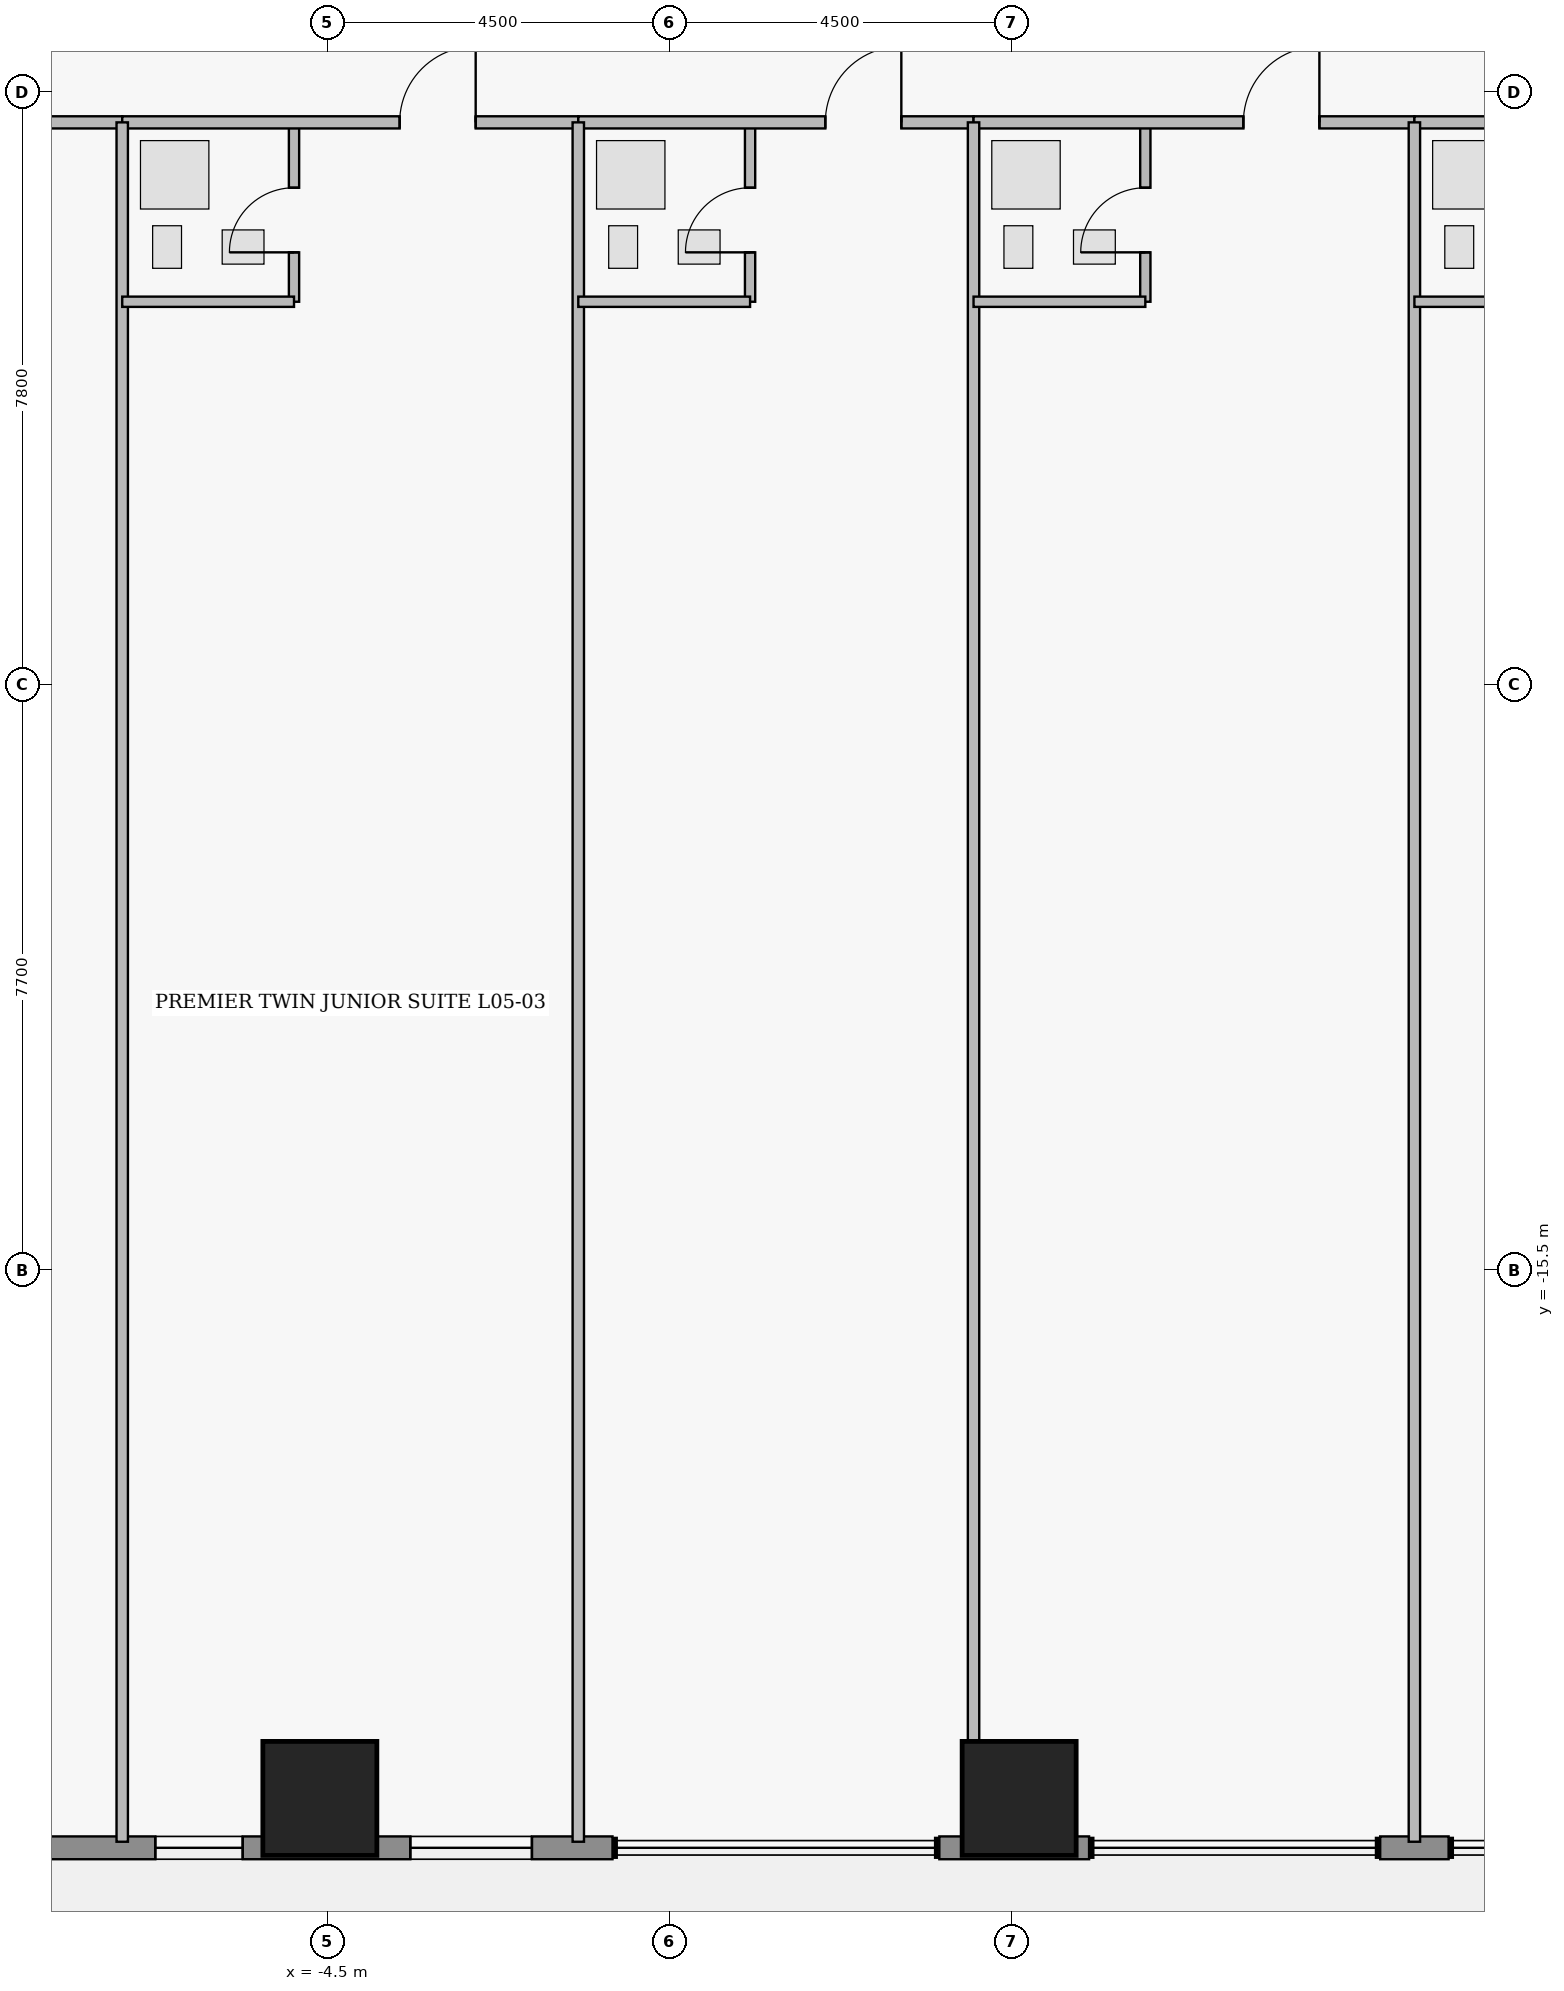
"""IFC4 building model, lengths in metres.
Left out: names, types, materials, properties, quantities, classifications, styles, units other than length and angle.
Written with IfcOpenShell. Run it as: python <this file> out.ifc"""

import sys

from ifc_helpers import new_model, si_unit, direction, frame, frame_2d, origin, origin_2d, place, context, subcontext, project, spatial, rectangle, extrude, element, fill, save


model = new_model("IFC4")
c1 = context("Model", 3, precision=1e-05, world=origin(), true_north=direction((0.0, 1.0)))
c2 = subcontext(c1, "Body", "Model", "MODEL_VIEW")
j1 = project(units=[si_unit("LENGTHUNIT", "METRE"), si_unit("PLANEANGLEUNIT", "RADIAN")], contexts=[c1])
p1 = place(None, origin())
s1 = spatial("IfcSite", under=j1, at=p1, CompositionType="ELEMENT")
p2 = place(p1, origin())
s2 = spatial("IfcBuilding", under=s1, at=p2, CompositionType="ELEMENT")
p3 = place(p2, frame((0.0, 0.0, 27.6)))
s3 = spatial("IfcBuildingStorey", under=s2, at=p3, CompositionType="ELEMENT", Elevation=27.6)
for number, where, z_axis, x_axis in (
    (1, (-4.6, -22.45, 0.0), (0.0, 0.0, 1.0), (1.0, 0.0, 0.0)),
    (2, (4.6, -22.45, 0.0), (0.0, 0.0, 1.0), (1.0, 0.0, 0.0)),
):
    element("IfcColumn", number, at=place(p3, frame(where, z_axis=z_axis, x_axis=x_axis)), inside=s3, PredefinedType="COLUMN", context=c2, shape_type="SweptSolid", body=[
        extrude(rectangle(XDim=1.5, YDim=1.5, at=origin_2d()), origin(), (0.0, 0.0, 1.0), 3.65),
    ])
p4 = place(p3, frame((10.25, -23.1, 0.0), z_axis=(0.0, 0.0, 1.0), x_axis=(-1.0, 0.0, 0.0)))
e3 = element("IfcWall", 3, at=p4, inside=s3, PredefinedType="STANDARD", context=c2, shape_type="SweptSolid", body=[
    extrude(rectangle(XDim=0.9, YDim=0.3, at=frame_2d((0.45, 0.0))), origin(), (0.0, 0.0, 1.0), 3.43),
])
p5 = place(p3, frame((5.52, -23.1, 0.0), z_axis=(0.0, 0.0, 1.0), x_axis=(-1.0, 0.0, 0.0)))
e4 = element("IfcWall", 4, at=p5, inside=s3, PredefinedType="STANDARD", context=c2, shape_type="SweptSolid", body=[
    extrude(rectangle(XDim=1.97, YDim=0.3, at=frame_2d((0.985, 0.0))), origin(), (0.0, 0.0, 1.0), 3.43),
])
p6 = place(p3, frame((-0.75, -23.1, 0.0), z_axis=(0.0, 0.0, 1.0), x_axis=(-1.0, 0.0, 0.0)))
e5 = element("IfcWall", 5, at=p6, inside=s3, PredefinedType="STANDARD", context=c2, shape_type="SweptSolid", body=[
    extrude(rectangle(XDim=13.97, YDim=0.3, at=frame_2d((6.985, 0.0))), origin(), (0.0, 0.0, 1.0), 3.43),
])
p7 = place(p6, frame((8.053, 0.0, 0.0)))
e6 = element("IfcOpeningElement", 6, at=p7, cuts=e5, PredefinedType="OPENING", context=c2, shape_type="SweptSolid", body=[
    extrude(rectangle(XDim=1.05, YDim=2.2, at=frame_2d((0.525, 1.1))), frame((0.0, 0.16, 0.0), z_axis=(0.0, -1.0, 0.0), x_axis=(1.0, 0.0, 0.0)), (0.0, 0.0, 1.0), 0.32),
])
p8 = place(p6, frame((1.06, 0.0, 0.85)))
e7 = element("IfcOpeningElement", 7, at=p8, cuts=e5, PredefinedType="OPENING", context=c2, shape_type="SweptSolid", body=[
    extrude(rectangle(XDim=1.6, YDim=1.8, at=frame_2d((0.8, 0.9))), frame((0.0, 0.16, 0.0), z_axis=(0.0, -1.0, 0.0), x_axis=(1.0, 0.0, 0.0)), (0.0, 0.0, 1.0), 0.32),
])
p9 = place(p6, frame((4.865, 0.0, 0.95)))
e8 = element("IfcOpeningElement", 8, at=p9, cuts=e5, PredefinedType="OPENING", context=c2, shape_type="SweptSolid", body=[
    extrude(rectangle(XDim=1.15, YDim=1.55, at=frame_2d((0.575, 0.775))), frame((0.0, 0.16, 0.0), z_axis=(0.0, -1.0, 0.0), x_axis=(1.0, 0.0, 0.0)), (0.0, 0.0, 1.0), 0.32),
])
p10 = place(p6, frame((9.842, 0.0, 0.85)))
e9 = element("IfcOpeningElement", 9, at=p10, cuts=e5, PredefinedType="OPENING", context=c2, shape_type="SweptSolid", body=[
    extrude(rectangle(XDim=1.6, YDim=1.8, at=frame_2d((0.8, 0.9))), frame((0.0, 0.16, 0.0), z_axis=(0.0, -1.0, 0.0), x_axis=(1.0, 0.0, 0.0)), (0.0, 0.0, 1.0), 0.32),
])
p11 = place(p3, frame((-12.8, -0.4, 0.0), z_axis=(0.0, 0.0, 1.0), x_axis=(1.0, 0.0, 0.0)))
e10 = element("IfcWall", 10, at=p11, inside=s3, PredefinedType="PARTITIONING", context=c2, shape_type="SweptSolid", body=[
    extrude(rectangle(XDim=5.6, YDim=0.16, at=frame_2d((2.8, 0.0))), origin(), (0.0, 0.0, 1.0), 3.43),
])
p12 = place(p11, frame((3.45, 0.0, 0.0)))
e11 = element("IfcOpeningElement", 11, at=p12, cuts=e10, PredefinedType="OPENING", context=c2, shape_type="SweptSolid", body=[
    extrude(rectangle(XDim=1.0, YDim=2.15, at=frame_2d((0.5, 1.075))), frame((0.0, 0.09, 0.0), z_axis=(0.0, -1.0, 0.0), x_axis=(1.0, 0.0, 0.0)), (0.0, 0.0, 1.0), 0.18),
])
p13 = place(p3, frame((-4.94, -2.76, 0.0), z_axis=(0.0, 0.0, 1.0), x_axis=(0.0, 1.0, 0.0)))
e12 = element("IfcWall", 12, at=p13, inside=s3, PredefinedType="PLUMBINGWALL", context=c2, shape_type="SweptSolid", body=[
    extrude(rectangle(XDim=2.36, YDim=0.135, at=frame_2d((1.18, 0.0))), origin(), (0.0, 0.0, 1.0), 2.668),
])
p14 = place(p13, frame((0.65, 0.0, 0.0)))
e13 = element("IfcOpeningElement", 13, at=p14, cuts=e12, PredefinedType="OPENING", context=c2, shape_type="SweptSolid", body=[
    extrude(rectangle(XDim=0.85, YDim=2.1, at=frame_2d((0.425, 1.05))), frame((0.0, 0.077, 0.0), z_axis=(0.0, -1.0, 0.0), x_axis=(1.0, 0.0, 0.0)), (0.0, 0.0, 1.0), 0.155),
])
p15 = place(p3, frame((-7.2, -0.4, 0.0), z_axis=(0.0, 0.0, 1.0), x_axis=(1.0, 0.0, 0.0)))
e14 = element("IfcWall", 14, at=p15, inside=s3, PredefinedType="PARTITIONING", context=c2, shape_type="SweptSolid", body=[
    extrude(rectangle(XDim=6.0, YDim=0.16, at=frame_2d((3.0, 0.0))), origin(), (0.0, 0.0, 1.0), 3.43),
])
p16 = place(p15, frame((3.65, 0.0, 0.0)))
e15 = element("IfcOpeningElement", 15, at=p16, cuts=e14, PredefinedType="OPENING", context=c2, shape_type="SweptSolid", body=[
    extrude(rectangle(XDim=1.0, YDim=2.15, at=frame_2d((0.5, 1.075))), frame((0.0, 0.09, 0.0), z_axis=(0.0, -1.0, 0.0), x_axis=(1.0, 0.0, 0.0)), (0.0, 0.0, 1.0), 0.18),
])
p17 = place(p3, frame((1.06, -2.76, 0.0), z_axis=(0.0, 0.0, 1.0), x_axis=(0.0, 1.0, 0.0)))
e16 = element("IfcWall", 16, at=p17, inside=s3, PredefinedType="PLUMBINGWALL", context=c2, shape_type="SweptSolid", body=[
    extrude(rectangle(XDim=2.36, YDim=0.135, at=frame_2d((1.18, 0.0))), origin(), (0.0, 0.0, 1.0), 3.43),
])
p18 = place(p17, frame((0.65, 0.0, 0.0)))
e17 = element("IfcOpeningElement", 17, at=p18, cuts=e16, PredefinedType="OPENING", context=c2, shape_type="SweptSolid", body=[
    extrude(rectangle(XDim=0.85, YDim=2.1, at=frame_2d((0.425, 1.05))), frame((0.0, 0.077, 0.0), z_axis=(0.0, -1.0, 0.0), x_axis=(1.0, 0.0, 0.0)), (0.0, 0.0, 1.0), 0.155),
])
p19 = place(p3, frame((-1.2, -0.4, 0.0), z_axis=(0.0, 0.0, 1.0), x_axis=(1.0, 0.0, 0.0)))
e18 = element("IfcWall", 18, at=p19, inside=s3, PredefinedType="PARTITIONING", context=c2, shape_type="SweptSolid", body=[
    extrude(rectangle(XDim=5.2, YDim=0.16, at=frame_2d((2.6, 0.0))), origin(), (0.0, 0.0, 1.0), 3.43),
])
p20 = place(p19, frame((3.25, 0.0, 0.0)))
e19 = element("IfcOpeningElement", 19, at=p20, cuts=e18, PredefinedType="OPENING", context=c2, shape_type="SweptSolid", body=[
    extrude(rectangle(XDim=1.0, YDim=2.15, at=frame_2d((0.5, 1.075))), frame((0.0, 0.09, 0.0), z_axis=(0.0, -1.0, 0.0), x_axis=(1.0, 0.0, 0.0)), (0.0, 0.0, 1.0), 0.18),
])
p21 = place(p3, frame((6.26, -2.76, 0.0), z_axis=(0.0, 0.0, 1.0), x_axis=(0.0, 1.0, 0.0)))
e20 = element("IfcWall", 20, at=p21, inside=s3, PredefinedType="PLUMBINGWALL", context=c2, shape_type="SweptSolid", body=[
    extrude(rectangle(XDim=2.36, YDim=0.135, at=frame_2d((1.18, 0.0))), origin(), (0.0, 0.0, 1.0), 3.43),
])
p22 = place(p21, frame((0.65, 0.0, 0.0)))
e21 = element("IfcOpeningElement", 21, at=p22, cuts=e20, PredefinedType="OPENING", context=c2, shape_type="SweptSolid", body=[
    extrude(rectangle(XDim=0.85, YDim=2.1, at=frame_2d((0.425, 1.05))), frame((0.0, 0.077, 0.0), z_axis=(0.0, -1.0, 0.0), x_axis=(1.0, 0.0, 0.0)), (0.0, 0.0, 1.0), 0.155),
])
p23 = place(p3, frame((4.0, -0.4, 0.0), z_axis=(0.0, 0.0, 1.0), x_axis=(1.0, 0.0, 0.0)))
e22 = element("IfcWall", 22, at=p23, inside=s3, PredefinedType="PARTITIONING", context=c2, shape_type="SweptSolid", body=[
    extrude(rectangle(XDim=5.8, YDim=0.16, at=frame_2d((2.9, 0.0))), origin(), (0.0, 0.0, 1.0), 3.43),
])
p24 = place(p23, frame((3.55, 0.0, 0.0)))
e23 = element("IfcOpeningElement", 23, at=p24, cuts=e22, PredefinedType="OPENING", context=c2, shape_type="SweptSolid", body=[
    extrude(rectangle(XDim=1.0, YDim=2.15, at=frame_2d((0.5, 1.075))), frame((0.0, 0.09, 0.0), z_axis=(0.0, -1.0, 0.0), x_axis=(1.0, 0.0, 0.0)), (0.0, 0.0, 1.0), 0.18),
])
p25 = place(p3, frame((9.8, -0.4, 0.0), z_axis=(0.0, 0.0, 1.0), x_axis=(1.0, 0.0, 0.0)))
e24 = element("IfcWall", 24, at=p25, inside=s3, PredefinedType="PARTITIONING", context=c2, shape_type="SweptSolid", body=[
    extrude(rectangle(XDim=4.6, YDim=0.16, at=frame_2d((2.3, 0.0))), origin(), (0.0, 0.0, 1.0), 3.43),
])
p26 = place(p25, frame((2.95, 0.0, 0.0)))
e25 = element("IfcOpeningElement", 25, at=p26, cuts=e24, PredefinedType="OPENING", context=c2, shape_type="SweptSolid", body=[
    extrude(rectangle(XDim=1.0, YDim=2.15, at=frame_2d((0.5, 1.075))), frame((0.0, 0.09, 0.0), z_axis=(0.0, -1.0, 0.0), x_axis=(1.0, 0.0, 0.0)), (0.0, 0.0, 1.0), 0.18),
])
p27 = place(p3, frame((-7.2, -23.02, 0.0), z_axis=(0.0, 0.0, 1.0), x_axis=(0.0, 1.0, 0.0)))
e26 = element("IfcWall", 26, at=p27, inside=s3, PredefinedType="PARTITIONING", context=c2, shape_type="SweptSolid", body=[
    extrude(rectangle(XDim=22.62, YDim=0.15, at=frame_2d((11.31, 0.0))), origin(), (0.0, 0.0, 1.0), 3.43),
])
p28 = place(p3, frame((-7.2, -2.76, 0.0), z_axis=(0.0, 0.0, 1.0), x_axis=(1.0, 0.0, 0.0)))
e27 = element("IfcWall", 27, at=p28, inside=s3, PredefinedType="PLUMBINGWALL", context=c2, shape_type="SweptSolid", body=[
    extrude(rectangle(XDim=2.26, YDim=0.135, at=frame_2d((1.13, 0.0))), origin(), (0.0, 0.0, 1.0), 3.43),
])
p29 = place(p3, frame((-1.2, -23.02, 0.0), z_axis=(0.0, 0.0, 1.0), x_axis=(0.0, 1.0, 0.0)))
e28 = element("IfcWall", 28, at=p29, inside=s3, PredefinedType="PARTITIONING", context=c2, shape_type="SweptSolid", body=[
    extrude(rectangle(XDim=22.62, YDim=0.15, at=frame_2d((11.31, 0.0))), origin(), (0.0, 0.0, 1.0), 3.43),
])
p30 = place(p3, frame((-1.2, -2.76, 0.0), z_axis=(0.0, 0.0, 1.0), x_axis=(1.0, 0.0, 0.0)))
e29 = element("IfcWall", 29, at=p30, inside=s3, PredefinedType="PLUMBINGWALL", context=c2, shape_type="SweptSolid", body=[
    extrude(rectangle(XDim=2.26, YDim=0.135, at=frame_2d((1.13, 0.0))), origin(), (0.0, 0.0, 1.0), 3.43),
])
p31 = place(p3, frame((4.0, -23.02, 0.0), z_axis=(0.0, 0.0, 1.0), x_axis=(0.0, 1.0, 0.0)))
e30 = element("IfcWall", 30, at=p31, inside=s3, PredefinedType="PARTITIONING", context=c2, shape_type="SweptSolid", body=[
    extrude(rectangle(XDim=22.62, YDim=0.15, at=frame_2d((11.31, 0.0))), origin(), (0.0, 0.0, 1.0), 3.43),
])
p32 = place(p3, frame((4.0, -2.76, 0.0), z_axis=(0.0, 0.0, 1.0), x_axis=(1.0, 0.0, 0.0)))
e31 = element("IfcWall", 31, at=p32, inside=s3, PredefinedType="PLUMBINGWALL", context=c2, shape_type="SweptSolid", body=[
    extrude(rectangle(XDim=2.26, YDim=0.135, at=frame_2d((1.13, 0.0))), origin(), (0.0, 0.0, 1.0), 3.43),
])
p33 = place(p3, frame((9.8, -23.02, 0.0), z_axis=(0.0, 0.0, 1.0), x_axis=(0.0, 1.0, 0.0)))
e32 = element("IfcWall", 32, at=p33, inside=s3, PredefinedType="PARTITIONING", context=c2, shape_type="SweptSolid", body=[
    extrude(rectangle(XDim=22.62, YDim=0.15, at=frame_2d((11.31, 0.0))), origin(), (0.0, 0.0, 1.0), 3.43),
])
p34 = place(p3, frame((9.8, -2.76, 0.0), z_axis=(0.0, 0.0, 1.0), x_axis=(1.0, 0.0, 0.0)))
e33 = element("IfcWall", 33, at=p34, inside=s3, PredefinedType="PLUMBINGWALL", context=c2, shape_type="SweptSolid", body=[
    extrude(rectangle(XDim=2.26, YDim=0.135, at=frame_2d((1.13, 0.0))), origin(), (0.0, 0.0, 1.0), 3.43),
])
p35 = place(p8, origin())
e34 = element("IfcWindow", 34, at=p35, inside=s3, PartitioningType="SINGLE_PANEL", PredefinedType="WINDOW", context=c2, shape_type="SweptSolid", body=[
    extrude(rectangle(XDim=1.6, YDim=1.8, at=frame_2d((0.8, 0.9))), frame((0.0, 0.03, 0.0), z_axis=(0.0, -1.0, 0.0), x_axis=(1.0, 0.0, 0.0)), (0.0, 0.0, 1.0), 0.06),
])
fill(e7, e34)
p36 = place(p9, origin())
e35 = element("IfcWindow", 35, at=p36, inside=s3, PartitioningType="SINGLE_PANEL", PredefinedType="WINDOW", context=c2, shape_type="SweptSolid", body=[
    extrude(rectangle(XDim=1.15, YDim=1.55, at=frame_2d((0.575, 0.775))), frame((0.0, 0.03, 0.0), z_axis=(0.0, -1.0, 0.0), x_axis=(1.0, 0.0, 0.0)), (0.0, 0.0, 1.0), 0.06),
])
fill(e8, e35)
p37 = place(p14, origin())
e36 = element("IfcDoor", 36, at=p37, inside=s3, OperationType="SINGLE_SWING_LEFT", PredefinedType="DOOR", context=c2, shape_type="SweptSolid", body=[
    extrude(rectangle(XDim=0.85, YDim=2.1, at=frame_2d((0.425, 1.05))), frame((0.0, 0.025, 0.0), z_axis=(0.0, -1.0, 0.0), x_axis=(1.0, 0.0, 0.0)), (0.0, 0.0, 1.0), 0.05),
])
fill(e13, e36)
p38 = place(p16, origin())
e37 = element("IfcDoor", 37, at=p38, inside=s3, OperationType="SINGLE_SWING_RIGHT", PredefinedType="DOOR", context=c2, shape_type="SweptSolid", body=[
    extrude(rectangle(XDim=1.0, YDim=2.15, at=frame_2d((0.5, 1.075))), frame((0.0, 0.025, 0.0), z_axis=(0.0, -1.0, 0.0), x_axis=(1.0, 0.0, 0.0)), (0.0, 0.0, 1.0), 0.05),
])
fill(e15, e37)
p39 = place(p18, origin())
e38 = element("IfcDoor", 38, at=p39, inside=s3, OperationType="SINGLE_SWING_LEFT", PredefinedType="DOOR", context=c2, shape_type="SweptSolid", body=[
    extrude(rectangle(XDim=0.85, YDim=2.1, at=frame_2d((0.425, 1.05))), frame((0.0, 0.025, 0.0), z_axis=(0.0, -1.0, 0.0), x_axis=(1.0, 0.0, 0.0)), (0.0, 0.0, 1.0), 0.05),
])
fill(e17, e38)
p40 = place(p20, origin())
e39 = element("IfcDoor", 39, at=p40, inside=s3, OperationType="SINGLE_SWING_RIGHT", PredefinedType="DOOR", context=c2, shape_type="SweptSolid", body=[
    extrude(rectangle(XDim=1.0, YDim=2.15, at=frame_2d((0.5, 1.075))), frame((0.0, 0.025, 0.0), z_axis=(0.0, -1.0, 0.0), x_axis=(1.0, 0.0, 0.0)), (0.0, 0.0, 1.0), 0.05),
])
fill(e19, e39)
p41 = place(p22, origin())
e40 = element("IfcDoor", 40, at=p41, inside=s3, OperationType="SINGLE_SWING_LEFT", PredefinedType="DOOR", context=c2, shape_type="SweptSolid", body=[
    extrude(rectangle(XDim=0.85, YDim=2.1, at=frame_2d((0.425, 1.05))), frame((0.0, 0.025, 0.0), z_axis=(0.0, -1.0, 0.0), x_axis=(1.0, 0.0, 0.0)), (0.0, 0.0, 1.0), 0.05),
])
fill(e21, e40)
p42 = place(p24, origin())
e41 = element("IfcDoor", 41, at=p42, inside=s3, OperationType="SINGLE_SWING_RIGHT", PredefinedType="DOOR", context=c2, shape_type="SweptSolid", body=[
    extrude(rectangle(XDim=1.0, YDim=2.15, at=frame_2d((0.5, 1.075))), frame((0.0, 0.025, 0.0), z_axis=(0.0, -1.0, 0.0), x_axis=(1.0, 0.0, 0.0)), (0.0, 0.0, 1.0), 0.05),
])
fill(e23, e41)
save(model, sys.argv[1])
